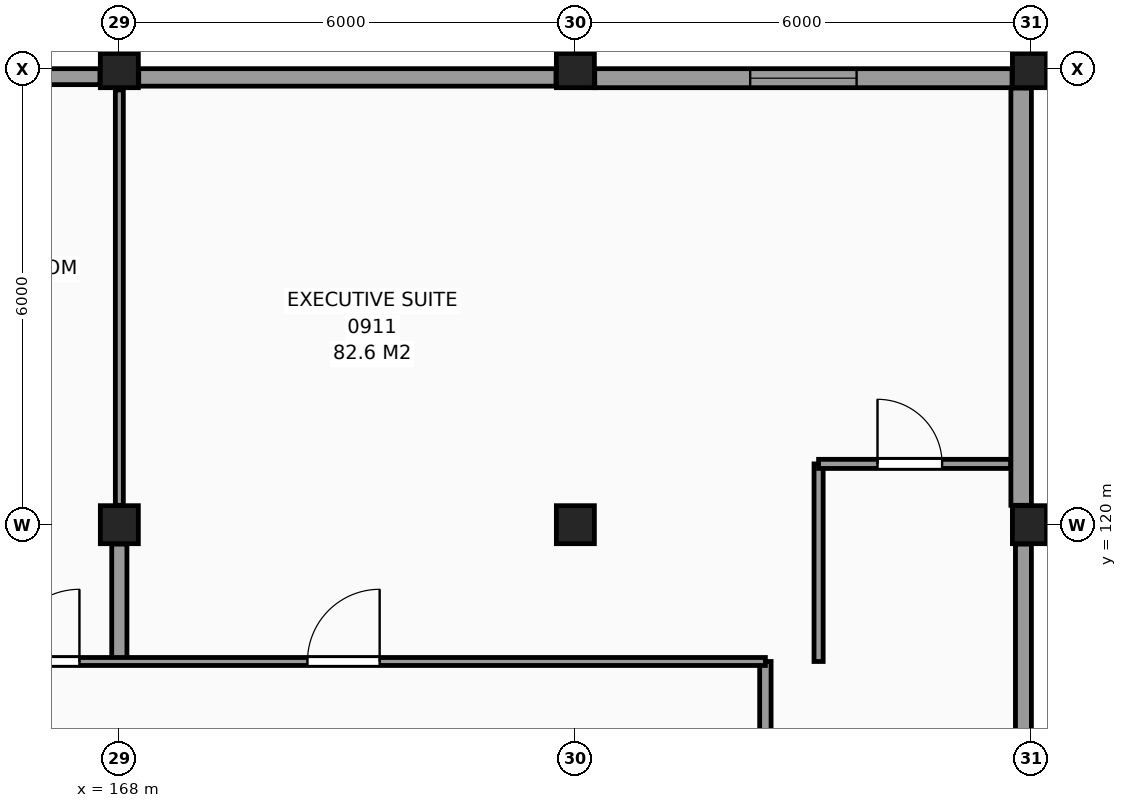
"""IFC4 building model, lengths in metres.
Left out: names, types, materials, properties, quantities, classifications, styles, units other than length and angle.
Written with IfcOpenShell. Run it as: python <this file> out.ifc"""

import sys

from ifc_helpers import new_model, si_unit, direction, frame, frame_2d, origin, origin_2d, place, context, subcontext, project, spatial, rectangle, extrude, element, fill, save


model = new_model("IFC4")
c1 = context("Model", 3, precision=1e-05, world=origin(), true_north=direction((0.0, 1.0)))
c2 = subcontext(c1, "Body", "Model", "MODEL_VIEW")
j1 = project(units=[si_unit("LENGTHUNIT", "METRE"), si_unit("PLANEANGLEUNIT", "RADIAN")], contexts=[c1])
p1 = place(None, origin())
s1 = spatial("IfcSite", under=j1, at=p1, CompositionType="ELEMENT")
p2 = place(p1, origin())
s2 = spatial("IfcBuilding", under=s1, at=p2, CompositionType="ELEMENT")
p3 = place(p2, frame((0.0, 0.0, 38.1)))
s3 = spatial("IfcBuildingStorey", under=s2, at=p3, CompositionType="ELEMENT", Elevation=38.1)
for number, where, z_axis, x_axis in (
    (1, (168.0, 120.0, 0.0), (0.0, 0.0, 1.0), (1.0, 0.0, 0.0)),
    (2, (168.0, 126.0, 0.0), (0.0, 0.0, 1.0), (1.0, 0.0, 0.0)),
    (3, (174.0, 120.0, 0.0), (0.0, 0.0, 1.0), (1.0, 0.0, 0.0)),
    (4, (174.0, 126.0, 0.0), (0.0, 0.0, 1.0), (1.0, 0.0, 0.0)),
    (5, (180.0, 120.0, 0.0), (0.0, 0.0, 1.0), (1.0, 0.0, 0.0)),
    (6, (180.0, 126.0, 0.0), (0.0, 0.0, 1.0), (1.0, 0.0, 0.0)),
):
    element("IfcColumn", number, at=place(p3, frame(where, z_axis=z_axis, x_axis=x_axis)), inside=s3, PredefinedType="COLUMN", context=c2, shape_type="SweptSolid", body=[
        extrude(rectangle(XDim=0.5, YDim=0.5, at=origin_2d()), origin(), (0.0, 0.0, 1.0), 3.3),
    ])
p4 = place(p3, frame((179.895, 114.255, 0.0), z_axis=(0.0, 0.0, 1.0), x_axis=(0.0, 1.0, 0.0)))
e7 = element("IfcWall", 7, at=p4, inside=s3, PredefinedType="SOLIDWALL", context=c2, shape_type="SweptSolid", body=[
    extrude(rectangle(XDim=5.49, YDim=0.21, at=frame_2d((2.745, 0.0))), origin(), (0.0, 0.0, 1.0), 2.41),
])
p5 = place(p3, frame((179.865, 120.255, 0.0), z_axis=(0.0, 0.0, 1.0), x_axis=(0.0, 1.0, 0.0)))
e8 = element("IfcWall", 8, at=p5, inside=s3, PredefinedType="SOLIDWALL", context=c2, shape_type="SweptSolid", body=[
    extrude(rectangle(XDim=5.49, YDim=0.27, at=frame_2d((2.745, 0.0))), origin(), (0.0, 0.0, 1.0), 2.41),
])
p6 = place(p3, frame((179.745, 125.875, 0.0), z_axis=(0.0, 0.0, 1.0), x_axis=(-1.0, 0.0, 0.0)))
e9 = element("IfcWall", 9, at=p6, inside=s3, PredefinedType="SOLIDWALL", context=c2, shape_type="SweptSolid", body=[
    extrude(rectangle(XDim=5.49, YDim=0.25, at=frame_2d((2.745, 0.0))), origin(), (0.0, 0.0, 1.0), 2.41),
])
p7 = place(p6, frame((2.045, 0.0, 0.8)))
e10 = element("IfcOpeningElement", 10, at=p7, cuts=e9, PredefinedType="OPENING", context=c2, shape_type="SweptSolid", body=[
    extrude(rectangle(XDim=1.4, YDim=1.4, at=frame_2d((0.7, 0.7))), frame((0.0, 0.135, 0.0), z_axis=(0.0, -1.0, 0.0), x_axis=(1.0, 0.0, 0.0)), (0.0, 0.0, 1.0), 0.27),
])
p8 = place(p3, frame((173.745, 125.885, 0.0), z_axis=(0.0, 0.0, 1.0), x_axis=(-1.0, 0.0, 0.0)))
e11 = element("IfcWall", 11, at=p8, inside=s3, PredefinedType="SOLIDWALL", context=c2, shape_type="SweptSolid", body=[
    extrude(rectangle(XDim=5.49, YDim=0.23, at=frame_2d((2.745, 0.0))), origin(), (0.0, 0.0, 1.0), 2.41),
])
p9 = place(p3, frame((167.745, 125.895, 0.0), z_axis=(0.0, 0.0, 1.0), x_axis=(-1.0, 0.0, 0.0)))
e12 = element("IfcWall", 12, at=p9, inside=s3, PredefinedType="SOLIDWALL", context=c2, shape_type="SweptSolid", body=[
    extrude(rectangle(XDim=5.49, YDim=0.21, at=frame_2d((2.745, 0.0))), origin(), (0.0, 0.0, 1.0), 2.41),
])
p10 = place(p9, frame((1.432, 0.0, 0.8)))
e13 = element("IfcOpeningElement", 13, at=p10, cuts=e12, PredefinedType="OPENING", context=c2, shape_type="SweptSolid", body=[
    extrude(rectangle(XDim=1.4, YDim=1.4, at=frame_2d((0.7, 0.7))), frame((0.0, 0.115, 0.0), z_axis=(0.0, -1.0, 0.0), x_axis=(1.0, 0.0, 0.0)), (0.0, 0.0, 1.0), 0.23),
])
p11 = place(p3, frame((168.0, 118.2, 0.0), z_axis=(0.0, 0.0, 1.0), x_axis=(0.0, 1.0, 0.0)))
e14 = element("IfcWall", 14, at=p11, inside=s3, PredefinedType="PARTITIONING", context=c2, shape_type="SweptSolid", body=[
    extrude(rectangle(XDim=1.545, YDim=0.2, at=frame_2d((0.772, 0.0))), origin(), (0.0, 0.0, 1.0), 2.72),
])
p12 = place(p3, frame((168.0, 120.255, 0.0), z_axis=(0.0, 0.0, 1.0), x_axis=(0.0, 1.0, 0.0)))
e15 = element("IfcWall", 15, at=p12, inside=s3, PredefinedType="PARTITIONING", context=c2, shape_type="SweptSolid", body=[
    extrude(rectangle(XDim=5.465, YDim=0.105, at=frame_2d((2.732, 0.0))), origin(), (0.0, 0.0, 1.0), 2.26),
])
p13 = place(p3, frame((176.5, 115.8, 0.0), z_axis=(0.0, 0.0, 1.0), x_axis=(0.0, 1.0, 0.0)))
e16 = element("IfcWall", 16, at=p13, inside=s3, PredefinedType="PARTITIONING", context=c2, shape_type="SweptSolid", body=[
    extrude(rectangle(XDim=2.4, YDim=0.15, at=frame_2d((1.2, 0.0))), origin(), (0.0, 0.0, 1.0), 3.06),
])
p14 = place(p3, frame((177.2, 118.2, 0.0), z_axis=(0.0, 0.0, 1.0), x_axis=(0.0, 1.0, 0.0)))
e17 = element("IfcWall", 17, at=p14, inside=s3, PredefinedType="PARTITIONING", context=c2, shape_type="SweptSolid", body=[
    extrude(rectangle(XDim=2.6, YDim=0.12, at=frame_2d((1.3, 0.0))), origin(), (0.0, 0.0, 1.0), 3.06),
])
p15 = place(p3, frame((102.215, 118.2, 0.0), z_axis=(0.0, 0.0, 1.0), x_axis=(1.0, 0.0, 0.0)))
e18 = element("IfcWall", 18, at=p15, inside=s3, PredefinedType="PARTITIONING", context=c2, shape_type="SweptSolid", body=[
    extrude(rectangle(XDim=74.285, YDim=0.105, at=frame_2d((37.143, 0.0))), origin(), (0.0, 0.0, 1.0), 3.06),
])
p16 = place(p15, frame((2.36, 0.0, 0.0)))
e19 = element("IfcOpeningElement", 19, at=p16, cuts=e18, PredefinedType="OPENING", context=c2, shape_type="SweptSolid", body=[
    extrude(rectangle(XDim=0.95, YDim=2.1, at=frame_2d((0.475, 1.05))), frame((0.0, 0.062, 0.0), z_axis=(0.0, -1.0, 0.0), x_axis=(1.0, 0.0, 0.0)), (0.0, 0.0, 1.0), 0.125),
])
p17 = place(p15, frame((9.41, 0.0, 0.0)))
e20 = element("IfcOpeningElement", 20, at=p17, cuts=e18, PredefinedType="OPENING", context=c2, shape_type="SweptSolid", body=[
    extrude(rectangle(XDim=0.95, YDim=2.1, at=frame_2d((0.475, 1.05))), frame((0.0, 0.062, 0.0), z_axis=(0.0, -1.0, 0.0), x_axis=(1.0, 0.0, 0.0)), (0.0, 0.0, 1.0), 0.125),
])
p18 = place(p15, frame((18.51, 0.0, 0.0)))
e21 = element("IfcOpeningElement", 21, at=p18, cuts=e18, PredefinedType="OPENING", context=c2, shape_type="SweptSolid", body=[
    extrude(rectangle(XDim=0.95, YDim=2.1, at=frame_2d((0.475, 1.05))), frame((0.0, 0.062, 0.0), z_axis=(0.0, -1.0, 0.0), x_axis=(1.0, 0.0, 0.0)), (0.0, 0.0, 1.0), 0.125),
])
p19 = place(p15, frame((32.36, 0.0, 0.0)))
e22 = element("IfcOpeningElement", 22, at=p19, cuts=e18, PredefinedType="OPENING", context=c2, shape_type="SweptSolid", body=[
    extrude(rectangle(XDim=0.95, YDim=2.1, at=frame_2d((0.475, 1.05))), frame((0.0, 0.062, 0.0), z_axis=(0.0, -1.0, 0.0), x_axis=(1.0, 0.0, 0.0)), (0.0, 0.0, 1.0), 0.125),
])
p20 = place(p15, frame((34.91, 0.0, 0.0)))
e23 = element("IfcOpeningElement", 23, at=p20, cuts=e18, PredefinedType="OPENING", context=c2, shape_type="SweptSolid", body=[
    extrude(rectangle(XDim=0.95, YDim=2.1, at=frame_2d((0.475, 1.05))), frame((0.0, 0.062, 0.0), z_axis=(0.0, -1.0, 0.0), x_axis=(1.0, 0.0, 0.0)), (0.0, 0.0, 1.0), 0.125),
])
p21 = place(p15, frame((42.11, 0.0, 0.0)))
e24 = element("IfcOpeningElement", 24, at=p21, cuts=e18, PredefinedType="OPENING", context=c2, shape_type="SweptSolid", body=[
    extrude(rectangle(XDim=0.95, YDim=2.1, at=frame_2d((0.475, 1.05))), frame((0.0, 0.062, 0.0), z_axis=(0.0, -1.0, 0.0), x_axis=(1.0, 0.0, 0.0)), (0.0, 0.0, 1.0), 0.125),
])
p22 = place(p15, frame((50.36, 0.0, 0.0)))
e25 = element("IfcOpeningElement", 25, at=p22, cuts=e18, PredefinedType="OPENING", context=c2, shape_type="SweptSolid", body=[
    extrude(rectangle(XDim=0.95, YDim=2.1, at=frame_2d((0.475, 1.05))), frame((0.0, 0.062, 0.0), z_axis=(0.0, -1.0, 0.0), x_axis=(1.0, 0.0, 0.0)), (0.0, 0.0, 1.0), 0.125),
])
p23 = place(p15, frame((52.91, 0.0, 0.0)))
e26 = element("IfcOpeningElement", 26, at=p23, cuts=e18, PredefinedType="OPENING", context=c2, shape_type="SweptSolid", body=[
    extrude(rectangle(XDim=0.95, YDim=2.1, at=frame_2d((0.475, 1.05))), frame((0.0, 0.062, 0.0), z_axis=(0.0, -1.0, 0.0), x_axis=(1.0, 0.0, 0.0)), (0.0, 0.0, 1.0), 0.125),
])
p24 = place(p15, frame((60.11, 0.0, 0.0)))
e27 = element("IfcOpeningElement", 27, at=p24, cuts=e18, PredefinedType="OPENING", context=c2, shape_type="SweptSolid", body=[
    extrude(rectangle(XDim=0.95, YDim=2.1, at=frame_2d((0.475, 1.05))), frame((0.0, 0.062, 0.0), z_axis=(0.0, -1.0, 0.0), x_axis=(1.0, 0.0, 0.0)), (0.0, 0.0, 1.0), 0.125),
])
p25 = place(p15, frame((64.31, 0.0, 0.0)))
e28 = element("IfcOpeningElement", 28, at=p25, cuts=e18, PredefinedType="OPENING", context=c2, shape_type="SweptSolid", body=[
    extrude(rectangle(XDim=0.95, YDim=2.1, at=frame_2d((0.475, 1.05))), frame((0.0, 0.062, 0.0), z_axis=(0.0, -1.0, 0.0), x_axis=(1.0, 0.0, 0.0)), (0.0, 0.0, 1.0), 0.125),
])
p26 = place(p15, frame((68.26, 0.0, 0.0)))
e29 = element("IfcOpeningElement", 29, at=p26, cuts=e18, PredefinedType="OPENING", context=c2, shape_type="SweptSolid", body=[
    extrude(rectangle(XDim=0.95, YDim=2.1, at=frame_2d((0.475, 1.05))), frame((0.0, 0.062, 0.0), z_axis=(0.0, -1.0, 0.0), x_axis=(1.0, 0.0, 0.0)), (0.0, 0.0, 1.0), 0.125),
])
p27 = place(p3, frame((177.2, 120.8, 0.0), z_axis=(0.0, 0.0, 1.0), x_axis=(1.0, 0.0, 0.0)))
e30 = element("IfcWall", 30, at=p27, inside=s3, PredefinedType="PARTITIONING", context=c2, shape_type="SweptSolid", body=[
    extrude(rectangle(XDim=2.525, YDim=0.12, at=frame_2d((1.263, 0.0))), origin(), (0.0, 0.0, 1.0), 3.06),
])
p28 = place(p27, frame((0.775, 0.0, 0.0)))
e31 = element("IfcOpeningElement", 31, at=p28, cuts=e30, PredefinedType="OPENING", context=c2, shape_type="SweptSolid", body=[
    extrude(rectangle(XDim=0.85, YDim=2.1, at=frame_2d((0.425, 1.05))), frame((0.0, 0.07, 0.0), z_axis=(0.0, -1.0, 0.0), x_axis=(1.0, 0.0, 0.0)), (0.0, 0.0, 1.0), 0.14),
])
p29 = place(p7, origin())
e32 = element("IfcWindow", 32, at=p29, inside=s3, PartitioningType="SINGLE_PANEL", PredefinedType="WINDOW", context=c2, shape_type="SweptSolid", body=[
    extrude(rectangle(XDim=1.4, YDim=1.4, at=frame_2d((0.7, 0.7))), frame((0.0, 0.03, 0.0), z_axis=(0.0, -1.0, 0.0), x_axis=(1.0, 0.0, 0.0)), (0.0, 0.0, 1.0), 0.06),
])
fill(e10, e32)
p30 = place(p25, origin())
e33 = element("IfcDoor", 33, at=p30, inside=s3, OperationType="SINGLE_SWING_RIGHT", PredefinedType="DOOR", context=c2, shape_type="SweptSolid", body=[
    extrude(rectangle(XDim=0.95, YDim=2.1, at=frame_2d((0.475, 1.05))), frame((0.0, 0.025, 0.0), z_axis=(0.0, -1.0, 0.0), x_axis=(1.0, 0.0, 0.0)), (0.0, 0.0, 1.0), 0.05),
])
fill(e28, e33)
p31 = place(p28, origin())
e34 = element("IfcDoor", 34, at=p31, inside=s3, OperationType="SINGLE_SWING_LEFT", PredefinedType="DOOR", context=c2, shape_type="SweptSolid", body=[
    extrude(rectangle(XDim=0.85, YDim=2.1, at=frame_2d((0.425, 1.05))), frame((0.0, 0.025, 0.0), z_axis=(0.0, -1.0, 0.0), x_axis=(1.0, 0.0, 0.0)), (0.0, 0.0, 1.0), 0.05),
])
fill(e31, e34)
p32 = place(p26, origin())
e35 = element("IfcDoor", 35, at=p32, inside=s3, OperationType="SINGLE_SWING_RIGHT", PredefinedType="DOOR", context=c2, shape_type="SweptSolid", body=[
    extrude(rectangle(XDim=0.95, YDim=2.1, at=frame_2d((0.475, 1.05))), frame((0.0, 0.025, 0.0), z_axis=(0.0, -1.0, 0.0), x_axis=(1.0, 0.0, 0.0)), (0.0, 0.0, 1.0), 0.05),
])
fill(e29, e35)
save(model, sys.argv[1])
